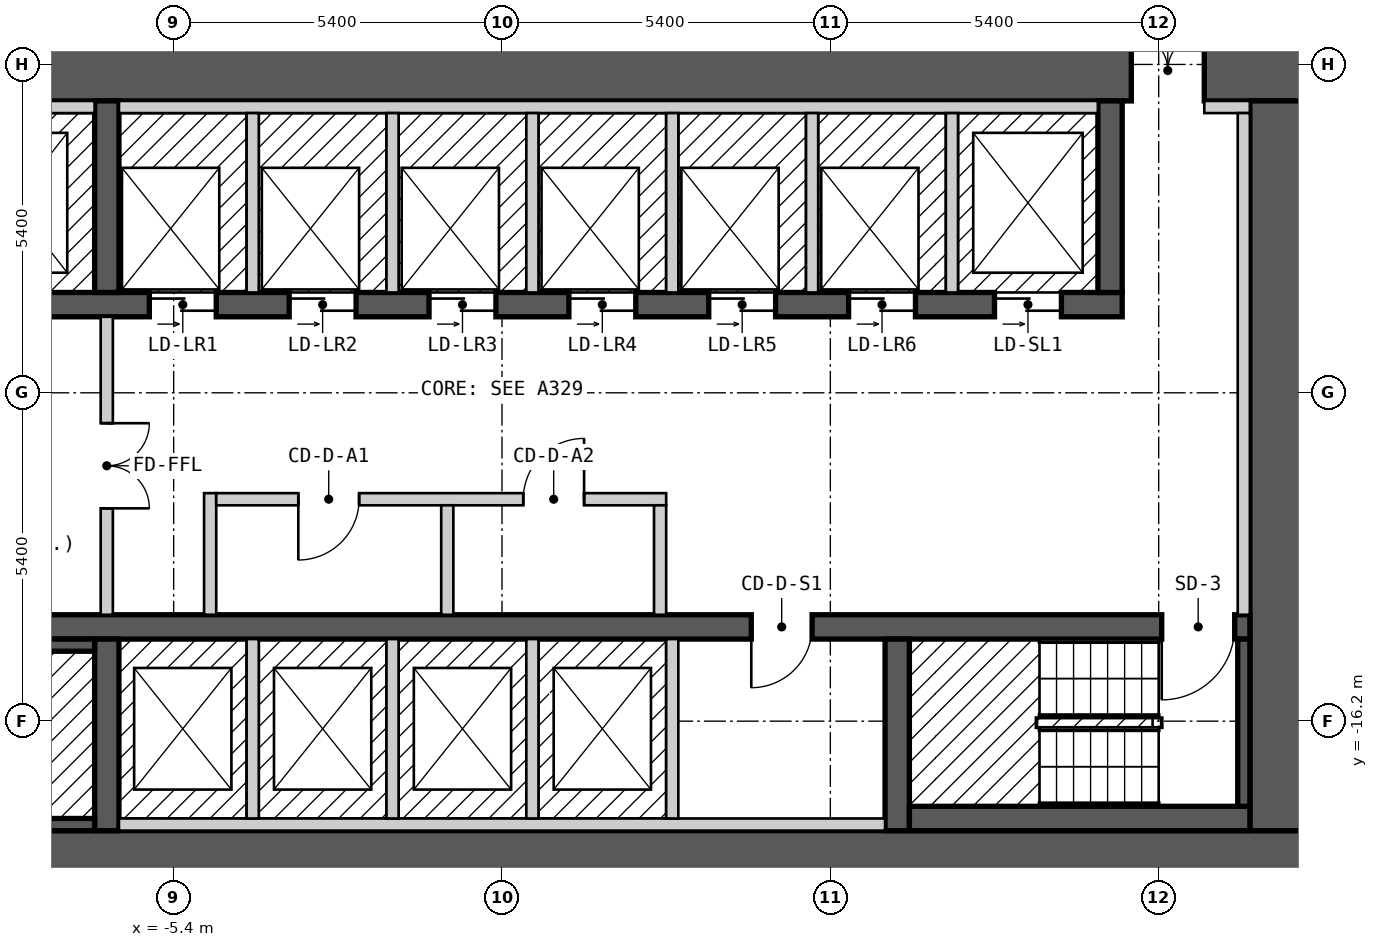
"""IFC4 building model, lengths in metres.
Left out: names, types, materials, properties, quantities, classifications, styles, units other than length and angle.
Written with IfcOpenShell. Run it as: python <this file> out.ifc"""

import sys

from ifc_helpers import new_model, si_unit, direction, frame, frame_2d, origin, place, context, subcontext, project, spatial, rectangle, extrude, element, fill, save


model = new_model("IFC4")
c1 = context("Model", 3, precision=1e-05, world=origin(), true_north=direction((0.0, 1.0)))
c2 = subcontext(c1, "Body", "Model", "MODEL_VIEW")
j1 = project(units=[si_unit("LENGTHUNIT", "METRE"), si_unit("PLANEANGLEUNIT", "RADIAN")], contexts=[c1])
p1 = place(None, origin())
s1 = spatial("IfcSite", under=j1, at=p1, CompositionType="ELEMENT")
p2 = place(p1, origin())
s2 = spatial("IfcBuilding", under=s1, at=p2, CompositionType="ELEMENT")
p3 = place(p2, frame((0.0, 0.0, 102.0)))
s3 = spatial("IfcBuildingStorey", under=s2, at=p3, CompositionType="ELEMENT", Elevation=102.0)
p4 = place(p3, frame((-13.3, -18.5, 0.0), z_axis=(0.0, 0.0, 1.0), x_axis=(1.0, 0.0, 0.0)))
e1 = element("IfcWall", 1, at=p4, inside=s3, PredefinedType="SHEAR", context=c2, shape_type="SweptSolid", body=[
    extrude(rectangle(XDim=26.6, YDim=1.0, at=frame_2d((13.3, 0.0))), origin(), (0.0, 0.0, 1.0), 2.7),
])
p5 = place(p3, frame((-13.3, -5.5, 0.0), z_axis=(0.0, 0.0, 1.0), x_axis=(1.0, 0.0, 0.0)))
e2 = element("IfcWall", 2, at=p5, inside=s3, PredefinedType="SHEAR", context=c2, shape_type="SweptSolid", body=[
    extrude(rectangle(XDim=26.6, YDim=1.0, at=frame_2d((13.3, 0.0))), origin(), (0.0, 0.0, 1.0), 2.7),
])
p6 = place(p5, frame((23.65, 0.0, 0.0)))
e3 = element("IfcOpeningElement", 3, at=p6, cuts=e2, PredefinedType="OPENING", context=c2, shape_type="SweptSolid", body=[
    extrude(rectangle(XDim=1.2, YDim=2.1, at=frame_2d((0.6, 1.05))), frame((0.0, 0.51, 0.0), z_axis=(0.0, -1.0, 0.0), x_axis=(1.0, 0.0, 0.0)), (0.0, 0.0, 1.0), 1.02),
])
p7 = place(p3, frame((12.8, -18.0, 0.0), z_axis=(0.0, 0.0, 1.0), x_axis=(0.0, 1.0, 0.0)))
e4 = element("IfcWall", 4, at=p7, inside=s3, PredefinedType="SHEAR", context=c2, shape_type="SweptSolid", body=[
    extrude(rectangle(XDim=12.0, YDim=1.0, at=frame_2d((6.0, 0.0))), origin(), (0.0, 0.0, 1.0), 2.7),
])
p8 = place(p3, frame((-12.3, -14.65, 0.0), z_axis=(0.0, 0.0, 1.0), x_axis=(1.0, 0.0, 0.0)))
e5 = element("IfcWall", 5, at=p8, inside=s3, PredefinedType="SHEAR", context=c2, shape_type="SweptSolid", body=[
    extrude(rectangle(XDim=24.6, YDim=0.4, at=frame_2d((12.3, 0.0))), origin(), (0.0, 0.0, 1.0), 2.7),
])
p9 = place(p8, frame((1.5, 0.0, 0.0), z_axis=(0.0, 0.0, 1.0), x_axis=(-1.0, 0.0, 0.0)))
e6 = element("IfcOpeningElement", 6, at=p9, cuts=e5, PredefinedType="OPENING", context=c2, shape_type="SweptSolid", body=[
    extrude(rectangle(XDim=1.2, YDim=2.1, at=frame_2d((0.6, 1.05))), frame((0.0, 0.21, 0.0), z_axis=(0.0, -1.0, 0.0), x_axis=(1.0, 0.0, 0.0)), (0.0, 0.0, 1.0), 0.42),
])
p10 = place(p8, frame((24.35, 0.0, 0.0), z_axis=(0.0, 0.0, 1.0), x_axis=(-1.0, 0.0, 0.0)))
e7 = element("IfcOpeningElement", 7, at=p10, cuts=e5, PredefinedType="OPENING", context=c2, shape_type="SweptSolid", body=[
    extrude(rectangle(XDim=1.2, YDim=2.1, at=frame_2d((0.6, 1.05))), frame((0.0, 0.21, 0.0), z_axis=(0.0, -1.0, 0.0), x_axis=(1.0, 0.0, 0.0)), (0.0, 0.0, 1.0), 0.42),
])
p11 = place(p8, frame((17.4, 0.0, 0.0), z_axis=(0.0, 0.0, 1.0), x_axis=(-1.0, 0.0, 0.0)))
e8 = element("IfcOpeningElement", 8, at=p11, cuts=e5, PredefinedType="OPENING", context=c2, shape_type="SweptSolid", body=[
    extrude(rectangle(XDim=1.0, YDim=2.1, at=frame_2d((0.5, 1.05))), frame((0.0, 0.21, 0.0), z_axis=(0.0, -1.0, 0.0), x_axis=(1.0, 0.0, 0.0)), (0.0, 0.0, 1.0), 0.42),
])
p12 = place(p3, frame((-12.3, -9.35, 0.0), z_axis=(0.0, 0.0, 1.0), x_axis=(1.0, 0.0, 0.0)))
e9 = element("IfcWall", 9, at=p12, inside=s3, PredefinedType="SHEAR", context=c2, shape_type="SweptSolid", body=[
    extrude(rectangle(XDim=22.5, YDim=0.4, at=frame_2d((11.25, 0.0))), origin(), (0.0, 0.0, 1.0), 2.7),
])
p13 = place(p12, frame((0.9, 0.0, 0.0)))
e10 = element("IfcOpeningElement", 10, at=p13, cuts=e9, PredefinedType="OPENING", context=c2, shape_type="SweptSolid", body=[
    extrude(rectangle(XDim=1.1, YDim=2.1, at=frame_2d((0.55, 1.05))), frame((0.0, 0.21, 0.0), z_axis=(0.0, -1.0, 0.0), x_axis=(1.0, 0.0, 0.0)), (0.0, 0.0, 1.0), 0.42),
])
p14 = place(p12, frame((3.7, 0.0, 0.0)))
e11 = element("IfcOpeningElement", 11, at=p14, cuts=e9, PredefinedType="OPENING", context=c2, shape_type="SweptSolid", body=[
    extrude(rectangle(XDim=1.1, YDim=2.1, at=frame_2d((0.55, 1.05))), frame((0.0, 0.21, 0.0), z_axis=(0.0, -1.0, 0.0), x_axis=(1.0, 0.0, 0.0)), (0.0, 0.0, 1.0), 0.42),
])
p15 = place(p12, frame((6.5, 0.0, 0.0)))
e12 = element("IfcOpeningElement", 12, at=p15, cuts=e9, PredefinedType="OPENING", context=c2, shape_type="SweptSolid", body=[
    extrude(rectangle(XDim=1.1, YDim=2.1, at=frame_2d((0.55, 1.05))), frame((0.0, 0.21, 0.0), z_axis=(0.0, -1.0, 0.0), x_axis=(1.0, 0.0, 0.0)), (0.0, 0.0, 1.0), 0.42),
])
p16 = place(p12, frame((8.8, 0.0, 0.0)))
e13 = element("IfcOpeningElement", 13, at=p16, cuts=e9, PredefinedType="OPENING", context=c2, shape_type="SweptSolid", body=[
    extrude(rectangle(XDim=1.1, YDim=2.1, at=frame_2d((0.55, 1.05))), frame((0.0, 0.21, 0.0), z_axis=(0.0, -1.0, 0.0), x_axis=(1.0, 0.0, 0.0)), (0.0, 0.0, 1.0), 0.42),
])
p17 = place(p12, frame((11.1, 0.0, 0.0)))
e14 = element("IfcOpeningElement", 14, at=p17, cuts=e9, PredefinedType="OPENING", context=c2, shape_type="SweptSolid", body=[
    extrude(rectangle(XDim=1.1, YDim=2.1, at=frame_2d((0.55, 1.05))), frame((0.0, 0.21, 0.0), z_axis=(0.0, -1.0, 0.0), x_axis=(1.0, 0.0, 0.0)), (0.0, 0.0, 1.0), 0.42),
])
p18 = place(p12, frame((13.4, 0.0, 0.0)))
e15 = element("IfcOpeningElement", 15, at=p18, cuts=e9, PredefinedType="OPENING", context=c2, shape_type="SweptSolid", body=[
    extrude(rectangle(XDim=1.1, YDim=2.1, at=frame_2d((0.55, 1.05))), frame((0.0, 0.21, 0.0), z_axis=(0.0, -1.0, 0.0), x_axis=(1.0, 0.0, 0.0)), (0.0, 0.0, 1.0), 0.42),
])
p19 = place(p12, frame((15.7, 0.0, 0.0)))
e16 = element("IfcOpeningElement", 16, at=p19, cuts=e9, PredefinedType="OPENING", context=c2, shape_type="SweptSolid", body=[
    extrude(rectangle(XDim=1.1, YDim=2.1, at=frame_2d((0.55, 1.05))), frame((0.0, 0.21, 0.0), z_axis=(0.0, -1.0, 0.0), x_axis=(1.0, 0.0, 0.0)), (0.0, 0.0, 1.0), 0.42),
])
p20 = place(p12, frame((18.0, 0.0, 0.0)))
e17 = element("IfcOpeningElement", 17, at=p20, cuts=e9, PredefinedType="OPENING", context=c2, shape_type="SweptSolid", body=[
    extrude(rectangle(XDim=1.1, YDim=2.1, at=frame_2d((0.55, 1.05))), frame((0.0, 0.21, 0.0), z_axis=(0.0, -1.0, 0.0), x_axis=(1.0, 0.0, 0.0)), (0.0, 0.0, 1.0), 0.42),
])
p21 = place(p12, frame((20.4, 0.0, 0.0)))
e18 = element("IfcOpeningElement", 18, at=p21, cuts=e9, PredefinedType="OPENING", context=c2, shape_type="SweptSolid", body=[
    extrude(rectangle(XDim=1.1, YDim=2.1, at=frame_2d((0.55, 1.05))), frame((0.0, 0.21, 0.0), z_axis=(0.0, -1.0, 0.0), x_axis=(1.0, 0.0, 0.0)), (0.0, 0.0, 1.0), 0.42),
])
for number, where, z_axis, x_axis in (
    (19, (-6.5, -18.0, 0.0), (0.0, 0.0, 1.0), (0.0, 1.0, 0.0)),
    (20, (6.5, -18.0, 0.0), (0.0, 0.0, 1.0), (0.0, 1.0, 0.0)),
    (21, (-6.5, -9.15, 0.0), (0.0, 0.0, 1.0), (0.0, 1.0, 0.0)),
    (22, (10.0, -9.15, 0.0), (0.0, 0.0, 1.0), (0.0, 1.0, 0.0)),
):
    element("IfcWall", number, at=place(p3, frame(where, z_axis=z_axis, x_axis=x_axis)), inside=s3, PredefinedType="SHEAR", context=c2, shape_type="SweptSolid", body=[
        extrude(rectangle(XDim=3.15, YDim=0.4, at=frame_2d((1.575, 0.0))), origin(), (0.0, 0.0, 1.0), 2.7),
    ])
for number, where, z_axis, x_axis in (
    (23, (-12.1, -17.9, 0.0), (0.0, 0.0, 1.0), (1.0, 0.0, 0.0)),
    (24, (-12.1, -6.1, 0.0), (0.0, 0.0, 1.0), (1.0, 0.0, 0.0)),
):
    element("IfcWall", number, at=place(p3, frame(where, z_axis=z_axis, x_axis=x_axis)), inside=s3, PredefinedType="SOLIDWALL", context=c2, shape_type="SweptSolid", body=[
        extrude(rectangle(XDim=5.4, YDim=0.2, at=frame_2d((2.7, 0.0))), origin(), (0.0, 0.0, 1.0), 2.7),
    ])
p22 = place(p3, frame((-10.8, -14.95, 0.0), z_axis=(0.0, 0.0, 1.0), x_axis=(1.0, 0.0, 0.0)))
e25 = element("IfcWall", 25, at=p22, inside=s3, PredefinedType="SOLIDWALL", context=c2, shape_type="SweptSolid", body=[
    extrude(rectangle(XDim=4.1, YDim=0.2, at=frame_2d((2.05, 0.0))), origin(), (0.0, 0.0, 1.0), 2.7),
])
p23 = place(p3, frame((-6.5, -14.45, 0.0), z_axis=(0.0, 0.0, 1.0), x_axis=(0.0, 1.0, 0.0)))
e26 = element("IfcWall", 26, at=p23, inside=s3, PredefinedType="PARTITIONING", context=c2, shape_type="SweptSolid", body=[
    extrude(rectangle(XDim=4.9, YDim=0.2, at=frame_2d((2.45, 0.0))), origin(), (0.0, 0.0, 1.0), 2.7),
])
p24 = place(p23, frame((3.15, 0.0, 0.0), z_axis=(0.0, 0.0, 1.0), x_axis=(-1.0, 0.0, 0.0)))
e27 = element("IfcOpeningElement", 27, at=p24, cuts=e26, PredefinedType="OPENING", context=c2, shape_type="SweptSolid", body=[
    extrude(rectangle(XDim=1.4, YDim=2.1, at=frame_2d((0.7, 1.05))), frame((0.0, 0.11, 0.0), z_axis=(0.0, -1.0, 0.0), x_axis=(1.0, 0.0, 0.0)), (0.0, 0.0, 1.0), 0.22),
])
p25 = place(p3, frame((-6.3, -17.9, 0.0), z_axis=(0.0, 0.0, 1.0), x_axis=(1.0, 0.0, 0.0)))
e28 = element("IfcWall", 28, at=p25, inside=s3, PredefinedType="SOLIDWALL", context=c2, shape_type="SweptSolid", body=[
    extrude(rectangle(XDim=12.6, YDim=0.2, at=frame_2d((6.3, 0.0))), origin(), (0.0, 0.0, 1.0), 2.7),
])
p26 = place(p3, frame((-6.3, -6.1, 0.0), z_axis=(0.0, 0.0, 1.0), x_axis=(1.0, 0.0, 0.0)))
e29 = element("IfcWall", 29, at=p26, inside=s3, PredefinedType="SOLIDWALL", context=c2, shape_type="SweptSolid", body=[
    extrude(rectangle(XDim=16.1, YDim=0.2, at=frame_2d((8.05, 0.0))), origin(), (0.0, 0.0, 1.0), 2.7),
])
p27 = place(p3, frame((-4.8, -14.45, 0.0), z_axis=(0.0, 0.0, 1.0), x_axis=(0.0, 1.0, 0.0)))
e30 = element("IfcWall", 30, at=p27, inside=s3, PredefinedType="PARTITIONING", context=c2, shape_type="SweptSolid", body=[
    extrude(rectangle(XDim=2.0, YDim=0.2, at=frame_2d((1.0, 0.0))), origin(), (0.0, 0.0, 1.0), 2.7),
])
p28 = place(p3, frame((-4.7, -12.55, 0.0), z_axis=(0.0, 0.0, 1.0), x_axis=(1.0, 0.0, 0.0)))
e31 = element("IfcWall", 31, at=p28, inside=s3, PredefinedType="PARTITIONING", context=c2, shape_type="SweptSolid", body=[
    extrude(rectangle(XDim=7.4, YDim=0.2, at=frame_2d((3.7, 0.0))), origin(), (0.0, 0.0, 1.0), 2.7),
])
p29 = place(p28, frame((2.35, 0.0, 0.0), z_axis=(0.0, 0.0, 1.0), x_axis=(-1.0, 0.0, 0.0)))
e32 = element("IfcOpeningElement", 32, at=p29, cuts=e31, PredefinedType="OPENING", context=c2, shape_type="SweptSolid", body=[
    extrude(rectangle(XDim=1.0, YDim=2.1, at=frame_2d((0.5, 1.05))), frame((0.0, 0.11, 0.0), z_axis=(0.0, -1.0, 0.0), x_axis=(1.0, 0.0, 0.0)), (0.0, 0.0, 1.0), 0.22),
])
p30 = place(p28, frame((6.05, 0.0, 0.0), z_axis=(0.0, 0.0, 1.0), x_axis=(-1.0, 0.0, 0.0)))
e33 = element("IfcOpeningElement", 33, at=p30, cuts=e31, PredefinedType="OPENING", context=c2, shape_type="SweptSolid", body=[
    extrude(rectangle(XDim=1.0, YDim=2.1, at=frame_2d((0.5, 1.05))), frame((0.0, 0.11, 0.0), z_axis=(0.0, -1.0, 0.0), x_axis=(1.0, 0.0, 0.0)), (0.0, 0.0, 1.0), 0.22),
])
for number, where, z_axis, x_axis in (
    (34, (-4.1, -17.8, 0.0), (0.0, 0.0, 1.0), (0.0, 1.0, 0.0)),
    (35, (-4.1, -9.15, 0.0), (0.0, 0.0, 1.0), (0.0, 1.0, 0.0)),
    (36, (-1.8, -17.8, 0.0), (0.0, 0.0, 1.0), (0.0, 1.0, 0.0)),
    (37, (-1.8, -9.15, 0.0), (0.0, 0.0, 1.0), (0.0, 1.0, 0.0)),
):
    element("IfcWall", number, at=place(p3, frame(where, z_axis=z_axis, x_axis=x_axis)), inside=s3, PredefinedType="SOLIDWALL", context=c2, shape_type="SweptSolid", body=[
        extrude(rectangle(XDim=2.95, YDim=0.2, at=frame_2d((1.475, 0.0))), origin(), (0.0, 0.0, 1.0), 2.7),
    ])
p31 = place(p3, frame((-0.9, -14.45, 0.0), z_axis=(0.0, 0.0, 1.0), x_axis=(0.0, 1.0, 0.0)))
e38 = element("IfcWall", 38, at=p31, inside=s3, PredefinedType="PARTITIONING", context=c2, shape_type="SweptSolid", body=[
    extrude(rectangle(XDim=1.8, YDim=0.2, at=frame_2d((0.9, 0.0))), origin(), (0.0, 0.0, 1.0), 2.7),
])
for number, where, z_axis, x_axis in (
    (39, (0.5, -17.8, 0.0), (0.0, 0.0, 1.0), (0.0, 1.0, 0.0)),
    (40, (0.5, -9.15, 0.0), (0.0, 0.0, 1.0), (0.0, 1.0, 0.0)),
):
    element("IfcWall", number, at=place(p3, frame(where, z_axis=z_axis, x_axis=x_axis)), inside=s3, PredefinedType="SOLIDWALL", context=c2, shape_type="SweptSolid", body=[
        extrude(rectangle(XDim=2.95, YDim=0.2, at=frame_2d((1.475, 0.0))), origin(), (0.0, 0.0, 1.0), 2.7),
    ])
p32 = place(p3, frame((2.6, -14.45, 0.0), z_axis=(0.0, 0.0, 1.0), x_axis=(0.0, 1.0, 0.0)))
e41 = element("IfcWall", 41, at=p32, inside=s3, PredefinedType="PARTITIONING", context=c2, shape_type="SweptSolid", body=[
    extrude(rectangle(XDim=1.8, YDim=0.2, at=frame_2d((0.9, 0.0))), origin(), (0.0, 0.0, 1.0), 2.7),
])
for number, where, z_axis, x_axis in (
    (42, (2.8, -17.8, 0.0), (0.0, 0.0, 1.0), (0.0, 1.0, 0.0)),
    (43, (2.8, -9.15, 0.0), (0.0, 0.0, 1.0), (0.0, 1.0, 0.0)),
    (44, (5.1, -9.15, 0.0), (0.0, 0.0, 1.0), (0.0, 1.0, 0.0)),
):
    element("IfcWall", number, at=place(p3, frame(where, z_axis=z_axis, x_axis=x_axis)), inside=s3, PredefinedType="SOLIDWALL", context=c2, shape_type="SweptSolid", body=[
        extrude(rectangle(XDim=2.95, YDim=0.2, at=frame_2d((1.475, 0.0))), origin(), (0.0, 0.0, 1.0), 2.7),
    ])
p33 = place(p3, frame((6.7, -17.8, 0.0), z_axis=(0.0, 0.0, 1.0), x_axis=(1.0, 0.0, 0.0)))
e45 = element("IfcWall", 45, at=p33, inside=s3, PredefinedType="SOLIDWALL", context=c2, shape_type="SweptSolid", body=[
    extrude(rectangle(XDim=5.6, YDim=0.4, at=frame_2d((2.8, 0.0))), origin(), (0.0, 0.0, 1.0), 2.7),
])
p34 = place(p3, frame((7.4, -9.15, 0.0), z_axis=(0.0, 0.0, 1.0), x_axis=(0.0, 1.0, 0.0)))
e46 = element("IfcWall", 46, at=p34, inside=s3, PredefinedType="SOLIDWALL", context=c2, shape_type="SweptSolid", body=[
    extrude(rectangle(XDim=2.95, YDim=0.2, at=frame_2d((1.475, 0.0))), origin(), (0.0, 0.0, 1.0), 2.7),
])
p35 = place(p3, frame((11.55, -6.1, 0.0), z_axis=(0.0, 0.0, 1.0), x_axis=(1.0, 0.0, 0.0)))
e47 = element("IfcWall", 47, at=p35, inside=s3, PredefinedType="PARTITIONING", context=c2, shape_type="SweptSolid", body=[
    extrude(rectangle(XDim=0.75, YDim=0.2, at=frame_2d((0.375, 0.0))), origin(), (0.0, 0.0, 1.0), 2.7),
])
p36 = place(p3, frame((12.2, -17.6, 0.0), z_axis=(0.0, 0.0, 1.0), x_axis=(0.0, 1.0, 0.0)))
e48 = element("IfcWall", 48, at=p36, inside=s3, PredefinedType="SOLIDWALL", context=c2, shape_type="SweptSolid", body=[
    extrude(rectangle(XDim=2.75, YDim=0.2, at=frame_2d((1.375, 0.0))), origin(), (0.0, 0.0, 1.0), 2.7),
])
p37 = place(p3, frame((12.2, -14.45, 0.0), z_axis=(0.0, 0.0, 1.0), x_axis=(0.0, 1.0, 0.0)))
e49 = element("IfcWall", 49, at=p37, inside=s3, PredefinedType="PARTITIONING", context=c2, shape_type="SweptSolid", body=[
    extrude(rectangle(XDim=8.25, YDim=0.2, at=frame_2d((4.125, 0.0))), origin(), (0.0, 0.0, 1.0), 2.7),
])
p38 = place(p15, origin())
e50 = element("IfcDoor", 50, at=p38, inside=s3, OperationType="DOUBLE_DOOR_SLIDING", PredefinedType="DOOR", context=c2, shape_type="SweptSolid", body=[
    extrude(rectangle(XDim=1.1, YDim=2.1, at=frame_2d((0.55, 1.05))), frame((0.0, 0.025, 0.0), z_axis=(0.0, -1.0, 0.0), x_axis=(1.0, 0.0, 0.0)), (0.0, 0.0, 1.0), 0.05),
])
fill(e12, e50)
p39 = place(p16, origin())
e51 = element("IfcDoor", 51, at=p39, inside=s3, OperationType="DOUBLE_DOOR_SLIDING", PredefinedType="DOOR", context=c2, shape_type="SweptSolid", body=[
    extrude(rectangle(XDim=1.1, YDim=2.1, at=frame_2d((0.55, 1.05))), frame((0.0, 0.025, 0.0), z_axis=(0.0, -1.0, 0.0), x_axis=(1.0, 0.0, 0.0)), (0.0, 0.0, 1.0), 0.05),
])
fill(e13, e51)
p40 = place(p17, origin())
e52 = element("IfcDoor", 52, at=p40, inside=s3, OperationType="DOUBLE_DOOR_SLIDING", PredefinedType="DOOR", context=c2, shape_type="SweptSolid", body=[
    extrude(rectangle(XDim=1.1, YDim=2.1, at=frame_2d((0.55, 1.05))), frame((0.0, 0.025, 0.0), z_axis=(0.0, -1.0, 0.0), x_axis=(1.0, 0.0, 0.0)), (0.0, 0.0, 1.0), 0.05),
])
fill(e14, e52)
p41 = place(p18, origin())
e53 = element("IfcDoor", 53, at=p41, inside=s3, OperationType="DOUBLE_DOOR_SLIDING", PredefinedType="DOOR", context=c2, shape_type="SweptSolid", body=[
    extrude(rectangle(XDim=1.1, YDim=2.1, at=frame_2d((0.55, 1.05))), frame((0.0, 0.025, 0.0), z_axis=(0.0, -1.0, 0.0), x_axis=(1.0, 0.0, 0.0)), (0.0, 0.0, 1.0), 0.05),
])
fill(e15, e53)
p42 = place(p19, origin())
e54 = element("IfcDoor", 54, at=p42, inside=s3, OperationType="DOUBLE_DOOR_SLIDING", PredefinedType="DOOR", context=c2, shape_type="SweptSolid", body=[
    extrude(rectangle(XDim=1.1, YDim=2.1, at=frame_2d((0.55, 1.05))), frame((0.0, 0.025, 0.0), z_axis=(0.0, -1.0, 0.0), x_axis=(1.0, 0.0, 0.0)), (0.0, 0.0, 1.0), 0.05),
])
fill(e16, e54)
p43 = place(p20, origin())
e55 = element("IfcDoor", 55, at=p43, inside=s3, OperationType="DOUBLE_DOOR_SLIDING", PredefinedType="DOOR", context=c2, shape_type="SweptSolid", body=[
    extrude(rectangle(XDim=1.1, YDim=2.1, at=frame_2d((0.55, 1.05))), frame((0.0, 0.025, 0.0), z_axis=(0.0, -1.0, 0.0), x_axis=(1.0, 0.0, 0.0)), (0.0, 0.0, 1.0), 0.05),
])
fill(e17, e55)
p44 = place(p21, origin())
e56 = element("IfcDoor", 56, at=p44, inside=s3, OperationType="DOUBLE_DOOR_SLIDING", PredefinedType="DOOR", context=c2, shape_type="SweptSolid", body=[
    extrude(rectangle(XDim=1.1, YDim=2.1, at=frame_2d((0.55, 1.05))), frame((0.0, 0.025, 0.0), z_axis=(0.0, -1.0, 0.0), x_axis=(1.0, 0.0, 0.0)), (0.0, 0.0, 1.0), 0.05),
])
fill(e18, e56)
p45 = place(p10, origin())
e57 = element("IfcDoor", 57, at=p45, inside=s3, OperationType="SINGLE_SWING_RIGHT", PredefinedType="DOOR", context=c2, shape_type="SweptSolid", body=[
    extrude(rectangle(XDim=1.2, YDim=2.1, at=frame_2d((0.6, 1.05))), frame((0.0, 0.025, 0.0), z_axis=(0.0, -1.0, 0.0), x_axis=(1.0, 0.0, 0.0)), (0.0, 0.0, 1.0), 0.05),
])
fill(e7, e57)
p46 = place(p24, origin())
e58 = element("IfcDoor", 58, at=p46, inside=s3, OperationType="DOUBLE_DOOR_SINGLE_SWING", PredefinedType="DOOR", context=c2, shape_type="SweptSolid", body=[
    extrude(rectangle(XDim=1.4, YDim=2.1, at=frame_2d((0.7, 1.05))), frame((0.0, 0.025, 0.0), z_axis=(0.0, -1.0, 0.0), x_axis=(1.0, 0.0, 0.0)), (0.0, 0.0, 1.0), 0.05),
])
fill(e27, e58)
p47 = place(p6, origin())
e59 = element("IfcDoor", 59, at=p47, inside=s3, OperationType="DOUBLE_DOOR_SINGLE_SWING", PredefinedType="DOOR", context=c2, shape_type="SweptSolid", body=[
    extrude(rectangle(XDim=1.2, YDim=2.1, at=frame_2d((0.6, 1.05))), frame((0.0, 0.025, 0.0), z_axis=(0.0, -1.0, 0.0), x_axis=(1.0, 0.0, 0.0)), (0.0, 0.0, 1.0), 0.05),
])
fill(e3, e59)
p48 = place(p29, origin())
e60 = element("IfcDoor", 60, at=p48, inside=s3, OperationType="SINGLE_SWING_RIGHT", PredefinedType="DOOR", context=c2, shape_type="SweptSolid", body=[
    extrude(rectangle(XDim=1.0, YDim=2.1, at=frame_2d((0.5, 1.05))), frame((0.0, 0.025, 0.0), z_axis=(0.0, -1.0, 0.0), x_axis=(1.0, 0.0, 0.0)), (0.0, 0.0, 1.0), 0.05),
])
fill(e32, e60)
p49 = place(p30, origin())
e61 = element("IfcDoor", 61, at=p49, inside=s3, OperationType="SINGLE_SWING_LEFT", PredefinedType="DOOR", context=c2, shape_type="SweptSolid", body=[
    extrude(rectangle(XDim=1.0, YDim=2.1, at=frame_2d((0.5, 1.05))), frame((0.0, 0.025, 0.0), z_axis=(0.0, -1.0, 0.0), x_axis=(1.0, 0.0, 0.0)), (0.0, 0.0, 1.0), 0.05),
])
fill(e33, e61)
p50 = place(p11, origin())
e62 = element("IfcDoor", 62, at=p50, inside=s3, OperationType="SINGLE_SWING_RIGHT", PredefinedType="DOOR", context=c2, shape_type="SweptSolid", body=[
    extrude(rectangle(XDim=1.0, YDim=2.1, at=frame_2d((0.5, 1.05))), frame((0.0, 0.025, 0.0), z_axis=(0.0, -1.0, 0.0), x_axis=(1.0, 0.0, 0.0)), (0.0, 0.0, 1.0), 0.05),
])
fill(e8, e62)
save(model, sys.argv[1])
